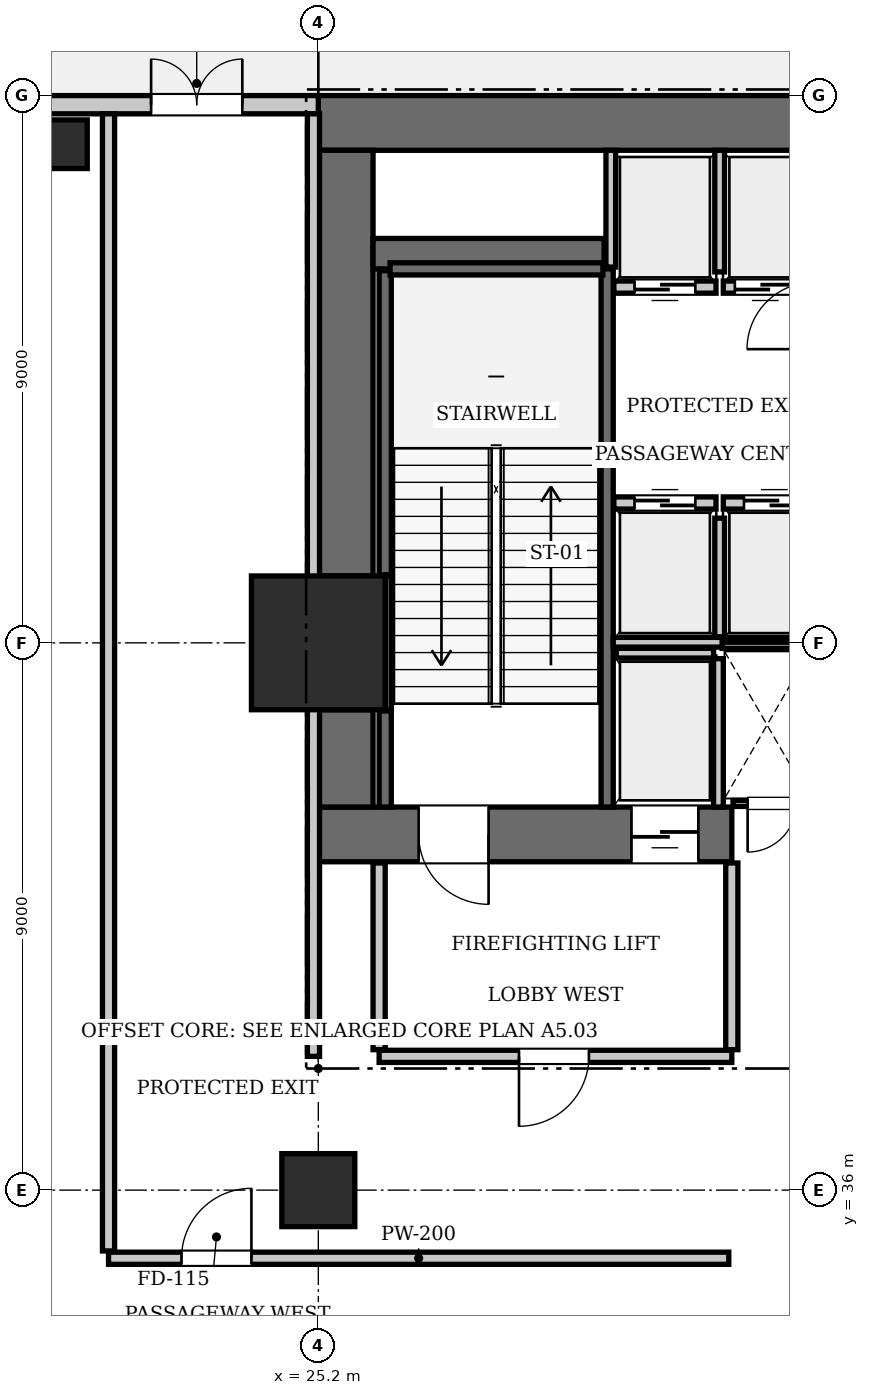
"""IFC4 building model, lengths in metres.
Left out: names, types, materials, properties, quantities, classifications, styles, units other than length and angle.
Written with IfcOpenShell. Run it as: python <this file> out.ifc"""

import sys

from ifc_helpers import new_model, si_unit, direction, frame, frame_2d, origin, origin_2d, place, context, subcontext, project, spatial, rectangle, extrude, element, fill, save


model = new_model("IFC4")
c1 = context("Model", 3, precision=1e-05, world=origin(), true_north=direction((0.0, 1.0)))
c2 = subcontext(c1, "Body", "Model", "MODEL_VIEW")
j1 = project(units=[si_unit("LENGTHUNIT", "METRE"), si_unit("PLANEANGLEUNIT", "RADIAN")], contexts=[c1])
p1 = place(None, origin())
s1 = spatial("IfcSite", under=j1, at=p1, CompositionType="ELEMENT")
p2 = place(p1, origin())
s2 = spatial("IfcBuilding", under=s1, at=p2, CompositionType="ELEMENT")
p3 = place(p2, origin())
s3 = spatial("IfcBuildingStorey", under=s2, at=p3, CompositionType="ELEMENT", Elevation=0.0)
p4 = place(p3, frame((25.2, 45.0, 0.0), z_axis=(0.0, 0.0, 1.0), x_axis=(1.0, 0.0, 0.0)))
e1 = element("IfcColumn", 1, at=p4, inside=s3, PredefinedType="COLUMN", context=c2, shape_type="SweptSolid", body=[
    extrude(rectangle(XDim=2.2, YDim=2.2, at=origin_2d()), origin(), (0.0, 0.0, 1.0), 5.6),
])
p5 = place(p3, frame((25.2, 53.55, 0.0), z_axis=(0.0, 0.0, 1.0), x_axis=(1.0, 0.0, 0.0)))
e2 = element("IfcWall", 2, at=p5, inside=s3, PredefinedType="SHEAR", context=c2, shape_type="SweptSolid", body=[
    extrude(rectangle(XDim=25.2, YDim=0.9, at=frame_2d((12.6, 0.0))), origin(), (0.0, 0.0, 1.0), 5.6),
])
p6 = place(p3, frame((25.2, 41.85, 0.0), z_axis=(0.0, 0.0, 1.0), x_axis=(1.0, 0.0, 0.0)))
e3 = element("IfcWall", 3, at=p6, inside=s3, PredefinedType="SHEAR", context=c2, shape_type="SweptSolid", body=[
    extrude(rectangle(XDim=6.8, YDim=0.9, at=frame_2d((3.4, 0.0))), origin(), (0.0, 0.0, 1.0), 5.6),
])
p7 = place(p6, frame((1.65, 0.0, 0.0)))
e4 = element("IfcOpeningElement", 4, at=p7, cuts=e3, PredefinedType="OPENING", context=c2, shape_type="SweptSolid", body=[
    extrude(rectangle(XDim=1.15, YDim=2.15, at=frame_2d((0.575, 1.075))), frame((0.0, 0.46, 0.0), z_axis=(0.0, -1.0, 0.0), x_axis=(1.0, 0.0, 0.0)), (0.0, 0.0, 1.0), 0.92),
])
p8 = place(p6, frame((5.15, 0.0, 0.0)))
e5 = element("IfcOpeningElement", 5, at=p8, cuts=e3, PredefinedType="OPENING", context=c2, shape_type="SweptSolid", body=[
    extrude(rectangle(XDim=1.1, YDim=2.2, at=frame_2d((0.55, 1.1))), frame((0.0, 0.46, 0.0), z_axis=(0.0, -1.0, 0.0), x_axis=(1.0, 0.0, 0.0)), (0.0, 0.0, 1.0), 0.92),
])
p9 = place(p3, frame((25.65, 42.3, 0.0), z_axis=(0.0, 0.0, 1.0), x_axis=(0.0, 1.0, 0.0)))
e6 = element("IfcWall", 6, at=p9, inside=s3, PredefinedType="SHEAR", context=c2, shape_type="SweptSolid", body=[
    extrude(rectangle(XDim=1.6, YDim=0.9, at=frame_2d((0.8, 0.0))), origin(), (0.0, 0.0, 1.0), 5.6),
])
p10 = place(p3, frame((25.65, 46.1, 0.0), z_axis=(0.0, 0.0, 1.0), x_axis=(0.0, 1.0, 0.0)))
e7 = element("IfcWall", 7, at=p10, inside=s3, PredefinedType="SHEAR", context=c2, shape_type="SweptSolid", body=[
    extrude(rectangle(XDim=7.0, YDim=0.9, at=frame_2d((3.5, 0.0))), origin(), (0.0, 0.0, 1.0), 5.6),
])
p11 = place(p3, frame((26.1, 51.4, 0.0), z_axis=(0.0, 0.0, 1.0), x_axis=(1.0, 0.0, 0.0)))
e8 = element("IfcWall", 8, at=p11, inside=s3, PredefinedType="SHEAR", context=c2, shape_type="SweptSolid", body=[
    extrude(rectangle(XDim=3.8, YDim=0.5, at=frame_2d((1.9, 0.0))), origin(), (0.0, 0.0, 1.0), 5.6),
])
p12 = place(p3, frame((25.2, 36.0, 0.0), z_axis=(0.0, 0.0, 1.0), x_axis=(1.0, 0.0, 0.0)))
e9 = element("IfcColumn", 9, at=p12, inside=s3, PredefinedType="COLUMN", context=c2, shape_type="SweptSolid", body=[
    extrude(rectangle(XDim=1.2, YDim=1.2, at=origin_2d()), origin(), (0.0, 0.0, 1.0), 5.6),
])
p13 = place(p3, frame((21.0, 53.2, 0.0), z_axis=(0.0, 0.0, 1.0), x_axis=(1.0, 0.0, 0.0)))
e10 = element("IfcColumn", 10, at=p13, inside=s3, PredefinedType="PILASTER", context=c2, shape_type="SweptSolid", body=[
    extrude(rectangle(XDim=0.8, YDim=0.8, at=origin_2d()), origin(), (0.0, 0.0, 1.0), 5.6),
])
p14 = place(p3, frame((29.95, 42.3, 0.0), z_axis=(0.0, 0.0, 1.0), x_axis=(0.0, 1.0, 0.0)))
e11 = element("IfcWall", 11, at=p14, inside=s3, PredefinedType="SOLIDWALL", context=c2, shape_type="SweptSolid", body=[
    extrude(rectangle(XDim=8.85, YDim=0.2, at=frame_2d((4.425, 0.0))), origin(), (0.0, 0.0, 1.0), 5.32),
])
p15 = place(p3, frame((26.3, 42.3, 0.0), z_axis=(0.0, 0.0, 1.0), x_axis=(0.0, 1.0, 0.0)))
e12 = element("IfcWall", 12, at=p15, inside=s3, PredefinedType="SOLIDWALL", context=c2, shape_type="SweptSolid", body=[
    extrude(rectangle(XDim=1.58, YDim=0.2, at=frame_2d((0.79, 0.0))), origin(), (0.0, 0.0, 1.0), 5.32),
])
p16 = place(p3, frame((26.3, 46.12, 0.0), z_axis=(0.0, 0.0, 1.0), x_axis=(0.0, 1.0, 0.0)))
e13 = element("IfcWall", 13, at=p16, inside=s3, PredefinedType="SOLIDWALL", context=c2, shape_type="SweptSolid", body=[
    extrude(rectangle(XDim=5.0, YDim=0.2, at=frame_2d((2.5, 0.0))), origin(), (0.0, 0.0, 1.0), 5.32),
])
p17 = place(p3, frame((26.38, 51.15, 0.0), z_axis=(0.0, 0.0, 1.0), x_axis=(1.0, 0.0, 0.0)))
e14 = element("IfcWall", 14, at=p17, inside=s3, PredefinedType="SOLIDWALL", context=c2, shape_type="SweptSolid", body=[
    extrude(rectangle(XDim=3.5, YDim=0.2, at=frame_2d((1.75, 0.0))), origin(), (0.0, 0.0, 1.0), 5.32),
])
p18 = place(p3, frame((26.352, 43.9, 0.0), z_axis=(0.0, 0.0, 1.0), x_axis=(0.0, 1.0, 0.0)))
e15 = element("IfcWall", 15, at=p18, inside=s3, PredefinedType="SOLIDWALL", context=c2, shape_type="SweptSolid", body=[
    extrude(rectangle(XDim=2.2, YDim=0.1, at=frame_2d((1.1, 0.0))), origin(), (0.0, 0.0, 1.0), 5.32),
])
p19 = place(p3, frame((30.06, 47.3, 0.0), z_axis=(0.0, 0.0, 1.0), x_axis=(1.0, 0.0, 0.0)))
e16 = element("IfcWall", 16, at=p19, inside=s3, PredefinedType="SOLIDWALL", context=c2, shape_type="SweptSolid", body=[
    extrude(rectangle(XDim=1.68, YDim=0.2, at=frame_2d((0.84, 0.0))), origin(), (0.0, 0.0, 1.0), 5.32),
])
p20 = place(p19, frame((0.34, 0.0, 0.0)))
e17 = element("IfcOpeningElement", 17, at=p20, cuts=e16, PredefinedType="OPENING", context=c2, shape_type="SweptSolid", body=[
    extrude(rectangle(XDim=1.0, YDim=2.15, at=frame_2d((0.5, 1.075))), frame((0.0, 0.11, 0.0), z_axis=(0.0, -1.0, 0.0), x_axis=(1.0, 0.0, 0.0)), (0.0, 0.0, 1.0), 0.22),
])
p21 = place(p3, frame((31.86, 47.3, 0.0), z_axis=(0.0, 0.0, 1.0), x_axis=(1.0, 0.0, 0.0)))
e18 = element("IfcWall", 18, at=p21, inside=s3, PredefinedType="SOLIDWALL", context=c2, shape_type="SweptSolid", body=[
    extrude(rectangle(XDim=1.68, YDim=0.2, at=frame_2d((0.84, 0.0))), origin(), (0.0, 0.0, 1.0), 5.32),
])
p22 = place(p21, frame((0.34, 0.0, 0.0)))
e19 = element("IfcOpeningElement", 19, at=p22, cuts=e18, PredefinedType="OPENING", context=c2, shape_type="SweptSolid", body=[
    extrude(rectangle(XDim=1.0, YDim=2.15, at=frame_2d((0.5, 1.075))), frame((0.0, 0.11, 0.0), z_axis=(0.0, -1.0, 0.0), x_axis=(1.0, 0.0, 0.0)), (0.0, 0.0, 1.0), 0.22),
])
p23 = place(p3, frame((30.06, 50.85, 0.0), z_axis=(0.0, 0.0, 1.0), x_axis=(1.0, 0.0, 0.0)))
e20 = element("IfcWall", 20, at=p23, inside=s3, PredefinedType="SOLIDWALL", context=c2, shape_type="SweptSolid", body=[
    extrude(rectangle(XDim=1.68, YDim=0.2, at=frame_2d((0.84, 0.0))), origin(), (0.0, 0.0, 1.0), 5.32),
])
p24 = place(p23, frame((0.34, 0.0, 0.0)))
e21 = element("IfcOpeningElement", 21, at=p24, cuts=e20, PredefinedType="OPENING", context=c2, shape_type="SweptSolid", body=[
    extrude(rectangle(XDim=1.0, YDim=2.15, at=frame_2d((0.5, 1.075))), frame((0.0, 0.11, 0.0), z_axis=(0.0, -1.0, 0.0), x_axis=(1.0, 0.0, 0.0)), (0.0, 0.0, 1.0), 0.22),
])
p25 = place(p3, frame((31.86, 50.85, 0.0), z_axis=(0.0, 0.0, 1.0), x_axis=(1.0, 0.0, 0.0)))
e22 = element("IfcWall", 22, at=p25, inside=s3, PredefinedType="SOLIDWALL", context=c2, shape_type="SweptSolid", body=[
    extrude(rectangle(XDim=1.38, YDim=0.2, at=frame_2d((0.69, 0.0))), origin(), (0.0, 0.0, 1.0), 5.32),
])
p26 = place(p25, frame((0.19, 0.0, 0.0)))
e23 = element("IfcOpeningElement", 23, at=p26, cuts=e22, PredefinedType="OPENING", context=c2, shape_type="SweptSolid", body=[
    extrude(rectangle(XDim=1.0, YDim=2.15, at=frame_2d((0.5, 1.075))), frame((0.0, 0.11, 0.0), z_axis=(0.0, -1.0, 0.0), x_axis=(1.0, 0.0, 0.0)), (0.0, 0.0, 1.0), 0.22),
])
p27 = place(p3, frame((30.1, 44.83, 0.0), z_axis=(0.0, 0.0, 1.0), x_axis=(1.0, 0.0, 0.0)))
e24 = element("IfcWall", 24, at=p27, inside=s3, PredefinedType="SOLIDWALL", context=c2, shape_type="SweptSolid", body=[
    extrude(rectangle(XDim=1.6, YDim=0.16, at=frame_2d((0.8, 0.0))), origin(), (0.0, 0.0, 1.0), 5.32),
])
p28 = place(p3, frame((31.78, 42.3, 0.0), z_axis=(0.0, 0.0, 1.0), x_axis=(0.0, 1.0, 0.0)))
e25 = element("IfcWall", 25, at=p28, inside=s3, PredefinedType="SOLIDWALL", context=c2, shape_type="SweptSolid", body=[
    extrude(rectangle(XDim=2.44, YDim=0.16, at=frame_2d((1.22, 0.0))), origin(), (0.0, 0.0, 1.0), 5.32),
])
p29 = place(p3, frame((31.8, 45.1, 0.0), z_axis=(0.0, 0.0, 1.0), x_axis=(0.0, 1.0, 0.0)))
e26 = element("IfcWall", 26, at=p29, inside=s3, PredefinedType="SOLIDWALL", context=c2, shape_type="SweptSolid", body=[
    extrude(rectangle(XDim=1.95, YDim=0.16, at=frame_2d((0.975, 0.0))), origin(), (0.0, 0.0, 1.0), 5.32),
])
p30 = place(p3, frame((30.05, 45.01, 0.0), z_axis=(0.0, 0.0, 1.0), x_axis=(1.0, 0.0, 0.0)))
e27 = element("IfcWall", 27, at=p30, inside=s3, PredefinedType="SOLIDWALL", context=c2, shape_type="SweptSolid", body=[
    extrude(rectangle(XDim=3.45, YDim=0.16, at=frame_2d((1.725, 0.0))), origin(), (0.0, 0.0, 1.0), 5.32),
])
p31 = place(p3, frame((30.01, 51.18, 0.0), z_axis=(0.0, 0.0, 1.0), x_axis=(0.0, 1.0, 0.0)))
e28 = element("IfcWall", 28, at=p31, inside=s3, PredefinedType="SOLIDWALL", context=c2, shape_type="SweptSolid", body=[
    extrude(rectangle(XDim=1.92, YDim=0.16, at=frame_2d((0.96, 0.0))), origin(), (0.0, 0.0, 1.0), 5.32),
])
p32 = place(p3, frame((31.8, 51.1, 0.0), z_axis=(0.0, 0.0, 1.0), x_axis=(0.0, 1.0, 0.0)))
e29 = element("IfcWall", 29, at=p32, inside=s3, PredefinedType="SOLIDWALL", context=c2, shape_type="SweptSolid", body=[
    extrude(rectangle(XDim=2.0, YDim=0.16, at=frame_2d((1.0, 0.0))), origin(), (0.0, 0.0, 1.0), 5.32),
])
p33 = place(p3, frame((6.95, 53.85, 0.0), z_axis=(0.0, 0.0, 1.0), x_axis=(1.0, 0.0, 0.0)))
e30 = element("IfcWall", 30, at=p33, inside=s3, PredefinedType="SOLIDWALL", context=c2, shape_type="SweptSolid", body=[
    extrude(rectangle(XDim=18.25, YDim=0.3, at=frame_2d((9.125, 0.0))), origin(), (0.0, 0.0, 1.0), 5.32),
])
p34 = place(p33, frame((11.2, 0.0, 0.0)))
e31 = element("IfcOpeningElement", 31, at=p34, cuts=e30, PredefinedType="OPENING", context=c2, shape_type="SweptSolid", body=[
    extrude(rectangle(XDim=1.5, YDim=2.2, at=frame_2d((0.75, 1.1))), frame((0.0, 0.16, 0.0), z_axis=(0.0, -1.0, 0.0), x_axis=(1.0, 0.0, 0.0)), (0.0, 0.0, 1.0), 0.32),
])
p35 = place(p33, frame((15.5, 0.0, 0.0)))
e32 = element("IfcOpeningElement", 32, at=p35, cuts=e30, PredefinedType="OPENING", context=c2, shape_type="SweptSolid", body=[
    extrude(rectangle(XDim=1.5, YDim=2.2, at=frame_2d((0.75, 1.1))), frame((0.0, 0.16, 0.0), z_axis=(0.0, -1.0, 0.0), x_axis=(1.0, 0.0, 0.0)), (0.0, 0.0, 1.0), 0.32),
])
p36 = place(p3, frame((26.2, 38.2, 0.0), z_axis=(0.0, 0.0, 1.0), x_axis=(1.0, 0.0, 0.0)))
e33 = element("IfcWall", 33, at=p36, inside=s3, PredefinedType="PARTITIONING", context=c2, shape_type="SweptSolid", body=[
    extrude(rectangle(XDim=5.8, YDim=0.2, at=frame_2d((2.9, 0.0))), origin(), (0.0, 0.0, 1.0), 5.32),
])
p37 = place(p36, frame((2.3, 0.0, 0.0)))
e34 = element("IfcOpeningElement", 34, at=p37, cuts=e33, PredefinedType="OPENING", context=c2, shape_type="SweptSolid", body=[
    extrude(rectangle(XDim=1.15, YDim=2.15, at=frame_2d((0.575, 1.075))), frame((0.0, 0.11, 0.0), z_axis=(0.0, -1.0, 0.0), x_axis=(1.0, 0.0, 0.0)), (0.0, 0.0, 1.0), 0.22),
])
for number, where, z_axis, x_axis in (
    (35, (26.2, 38.31, 0.0), (0.0, 0.0, 1.0), (0.0, 1.0, 0.0)),
    (36, (32.0, 38.31, 0.0), (0.0, 0.0, 1.0), (0.0, 1.0, 0.0)),
):
    element("IfcWall", number, at=place(p3, frame(where, z_axis=z_axis, x_axis=x_axis)), inside=s3, PredefinedType="PARTITIONING", context=c2, shape_type="SweptSolid", body=[
        extrude(rectangle(XDim=3.07, YDim=0.2, at=frame_2d((1.535, 0.0))), origin(), (0.0, 0.0, 1.0), 5.32),
    ])
p38 = place(p3, frame((32.02, 42.36, 0.0), z_axis=(0.0, 0.0, 1.0), x_axis=(1.0, 0.0, 0.0)))
e37 = element("IfcWall", 37, at=p38, inside=s3, PredefinedType="PARTITIONING", context=c2, shape_type="SweptSolid", body=[
    extrude(rectangle(XDim=1.32, YDim=0.1, at=frame_2d((0.66, 0.0))), origin(), (0.0, 0.0, 1.0), 5.32),
])
p39 = place(p38, frame((0.24, 0.0, 0.0)))
e38 = element("IfcOpeningElement", 38, at=p39, cuts=e37, PredefinedType="OPENING", context=c2, shape_type="SweptSolid", body=[
    extrude(rectangle(XDim=0.8, YDim=2.05, at=frame_2d((0.4, 1.025))), frame((0.0, 0.06, 0.0), z_axis=(0.0, -1.0, 0.0), x_axis=(1.0, 0.0, 0.0)), (0.0, 0.0, 1.0), 0.12),
])
p40 = place(p3, frame((31.84, 44.96, 0.0), z_axis=(0.0, 0.0, 1.0), x_axis=(1.0, 0.0, 0.0)))
e39 = element("IfcWall", 39, at=p40, inside=s3, PredefinedType="PARTITIONING", context=c2, shape_type="SweptSolid", body=[
    extrude(rectangle(XDim=1.48, YDim=0.1, at=frame_2d((0.74, 0.0))), origin(), (0.0, 0.0, 1.0), 5.32),
])
p41 = place(p3, frame((21.75, 34.88, 0.0), z_axis=(0.0, 0.0, 1.0), x_axis=(1.0, 0.0, 0.0)))
e40 = element("IfcWall", 40, at=p41, inside=s3, PredefinedType="PARTITIONING", context=c2, shape_type="SweptSolid", body=[
    extrude(rectangle(XDim=10.2, YDim=0.2, at=frame_2d((5.1, 0.0))), origin(), (0.0, 0.0, 1.0), 5.32),
])
p42 = place(p41, frame((1.2, 0.0, 0.0)))
e41 = element("IfcOpeningElement", 41, at=p42, cuts=e40, PredefinedType="OPENING", context=c2, shape_type="SweptSolid", body=[
    extrude(rectangle(XDim=1.15, YDim=2.15, at=frame_2d((0.575, 1.075))), frame((0.0, 0.11, 0.0), z_axis=(0.0, -1.0, 0.0), x_axis=(1.0, 0.0, 0.0)), (0.0, 0.0, 1.0), 0.22),
])
p43 = place(p3, frame((21.75, 35.0, 0.0), z_axis=(0.0, 0.0, 1.0), x_axis=(0.0, 1.0, 0.0)))
e42 = element("IfcWall", 42, at=p43, inside=s3, PredefinedType="PARTITIONING", context=c2, shape_type="SweptSolid", body=[
    extrude(rectangle(XDim=18.7, YDim=0.2, at=frame_2d((9.35, 0.0))), origin(), (0.0, 0.0, 1.0), 5.32),
])
p44 = place(p3, frame((25.12, 38.2, 0.0), z_axis=(0.0, 0.0, 1.0), x_axis=(0.0, 1.0, 0.0)))
e43 = element("IfcWall", 43, at=p44, inside=s3, PredefinedType="PARTITIONING", context=c2, shape_type="SweptSolid", body=[
    extrude(rectangle(XDim=15.5, YDim=0.2, at=frame_2d((7.75, 0.0))), origin(), (0.0, 0.0, 1.0), 4.685),
])
p45 = place(p7, frame((1.15, 0.0, 0.0), z_axis=(0.0, 0.0, 1.0), x_axis=(-1.0, 0.0, 0.0)))
e44 = element("IfcDoor", 44, at=p45, inside=s3, OperationType="SINGLE_SWING_LEFT", PredefinedType="DOOR", context=c2, shape_type="SweptSolid", body=[
    extrude(rectangle(XDim=1.15, YDim=2.15, at=frame_2d((0.575, 1.075))), frame((0.0, 0.025, 0.0), z_axis=(0.0, -1.0, 0.0), x_axis=(1.0, 0.0, 0.0)), (0.0, 0.0, 1.0), 0.05),
])
fill(e4, e44)
p46 = place(p20, origin())
e45 = element("IfcDoor", 45, at=p46, inside=s3, OperationType="SLIDING_TO_LEFT", PredefinedType="DOOR", context=c2, shape_type="SweptSolid", body=[
    extrude(rectangle(XDim=1.0, YDim=2.15, at=frame_2d((0.5, 1.075))), frame((0.0, 0.025, 0.0), z_axis=(0.0, -1.0, 0.0), x_axis=(1.0, 0.0, 0.0)), (0.0, 0.0, 1.0), 0.05),
])
fill(e17, e45)
p47 = place(p22, origin())
e46 = element("IfcDoor", 46, at=p47, inside=s3, OperationType="SLIDING_TO_LEFT", PredefinedType="DOOR", context=c2, shape_type="SweptSolid", body=[
    extrude(rectangle(XDim=1.0, YDim=2.15, at=frame_2d((0.5, 1.075))), frame((0.0, 0.025, 0.0), z_axis=(0.0, -1.0, 0.0), x_axis=(1.0, 0.0, 0.0)), (0.0, 0.0, 1.0), 0.05),
])
fill(e19, e46)
p48 = place(p24, frame((1.0, 0.0, 0.0), z_axis=(0.0, 0.0, 1.0), x_axis=(-1.0, 0.0, 0.0)))
e47 = element("IfcDoor", 47, at=p48, inside=s3, OperationType="SLIDING_TO_LEFT", PredefinedType="DOOR", context=c2, shape_type="SweptSolid", body=[
    extrude(rectangle(XDim=1.0, YDim=2.15, at=frame_2d((0.5, 1.075))), frame((0.0, 0.025, 0.0), z_axis=(0.0, -1.0, 0.0), x_axis=(1.0, 0.0, 0.0)), (0.0, 0.0, 1.0), 0.05),
])
fill(e21, e47)
p49 = place(p26, frame((1.0, 0.0, 0.0), z_axis=(0.0, 0.0, 1.0), x_axis=(-1.0, 0.0, 0.0)))
e48 = element("IfcDoor", 48, at=p49, inside=s3, OperationType="SLIDING_TO_LEFT", PredefinedType="DOOR", context=c2, shape_type="SweptSolid", body=[
    extrude(rectangle(XDim=1.0, YDim=2.15, at=frame_2d((0.5, 1.075))), frame((0.0, 0.025, 0.0), z_axis=(0.0, -1.0, 0.0), x_axis=(1.0, 0.0, 0.0)), (0.0, 0.0, 1.0), 0.05),
])
fill(e23, e48)
p50 = place(p8, frame((1.1, 0.0, 0.0), z_axis=(0.0, 0.0, 1.0), x_axis=(-1.0, 0.0, 0.0)))
e49 = element("IfcDoor", 49, at=p50, inside=s3, OperationType="SLIDING_TO_LEFT", PredefinedType="DOOR", context=c2, shape_type="SweptSolid", body=[
    extrude(rectangle(XDim=1.1, YDim=2.2, at=frame_2d((0.55, 1.1))), frame((0.0, 0.025, 0.0), z_axis=(0.0, -1.0, 0.0), x_axis=(1.0, 0.0, 0.0)), (0.0, 0.0, 1.0), 0.05),
])
fill(e5, e49)
p51 = place(p35, origin())
e50 = element("IfcDoor", 50, at=p51, inside=s3, OperationType="DOUBLE_DOOR_SINGLE_SWING", PredefinedType="DOOR", context=c2, shape_type="SweptSolid", body=[
    extrude(rectangle(XDim=1.5, YDim=2.2, at=frame_2d((0.75, 1.1))), frame((0.0, 0.025, 0.0), z_axis=(0.0, -1.0, 0.0), x_axis=(1.0, 0.0, 0.0)), (0.0, 0.0, 1.0), 0.05),
])
fill(e32, e50)
p52 = place(p37, frame((1.15, 0.0, 0.0), z_axis=(0.0, 0.0, 1.0), x_axis=(-1.0, 0.0, 0.0)))
e51 = element("IfcDoor", 51, at=p52, inside=s3, OperationType="SINGLE_SWING_RIGHT", PredefinedType="DOOR", context=c2, shape_type="SweptSolid", body=[
    extrude(rectangle(XDim=1.15, YDim=2.15, at=frame_2d((0.575, 1.075))), frame((0.0, 0.025, 0.0), z_axis=(0.0, -1.0, 0.0), x_axis=(1.0, 0.0, 0.0)), (0.0, 0.0, 1.0), 0.05),
])
fill(e34, e51)
p53 = place(p39, frame((0.8, 0.0, 0.0), z_axis=(0.0, 0.0, 1.0), x_axis=(-1.0, 0.0, 0.0)))
e52 = element("IfcDoor", 52, at=p53, inside=s3, OperationType="SINGLE_SWING_RIGHT", PredefinedType="DOOR", context=c2, shape_type="SweptSolid", body=[
    extrude(rectangle(XDim=0.8, YDim=2.05, at=frame_2d((0.4, 1.025))), frame((0.0, 0.025, 0.0), z_axis=(0.0, -1.0, 0.0), x_axis=(1.0, 0.0, 0.0)), (0.0, 0.0, 1.0), 0.05),
])
fill(e38, e52)
p54 = place(p42, origin())
e53 = element("IfcDoor", 53, at=p54, inside=s3, OperationType="SINGLE_SWING_RIGHT", PredefinedType="DOOR", context=c2, shape_type="SweptSolid", body=[
    extrude(rectangle(XDim=1.15, YDim=2.15, at=frame_2d((0.575, 1.075))), frame((0.0, 0.025, 0.0), z_axis=(0.0, -1.0, 0.0), x_axis=(1.0, 0.0, 0.0)), (0.0, 0.0, 1.0), 0.05),
])
fill(e41, e53)
save(model, sys.argv[1])
